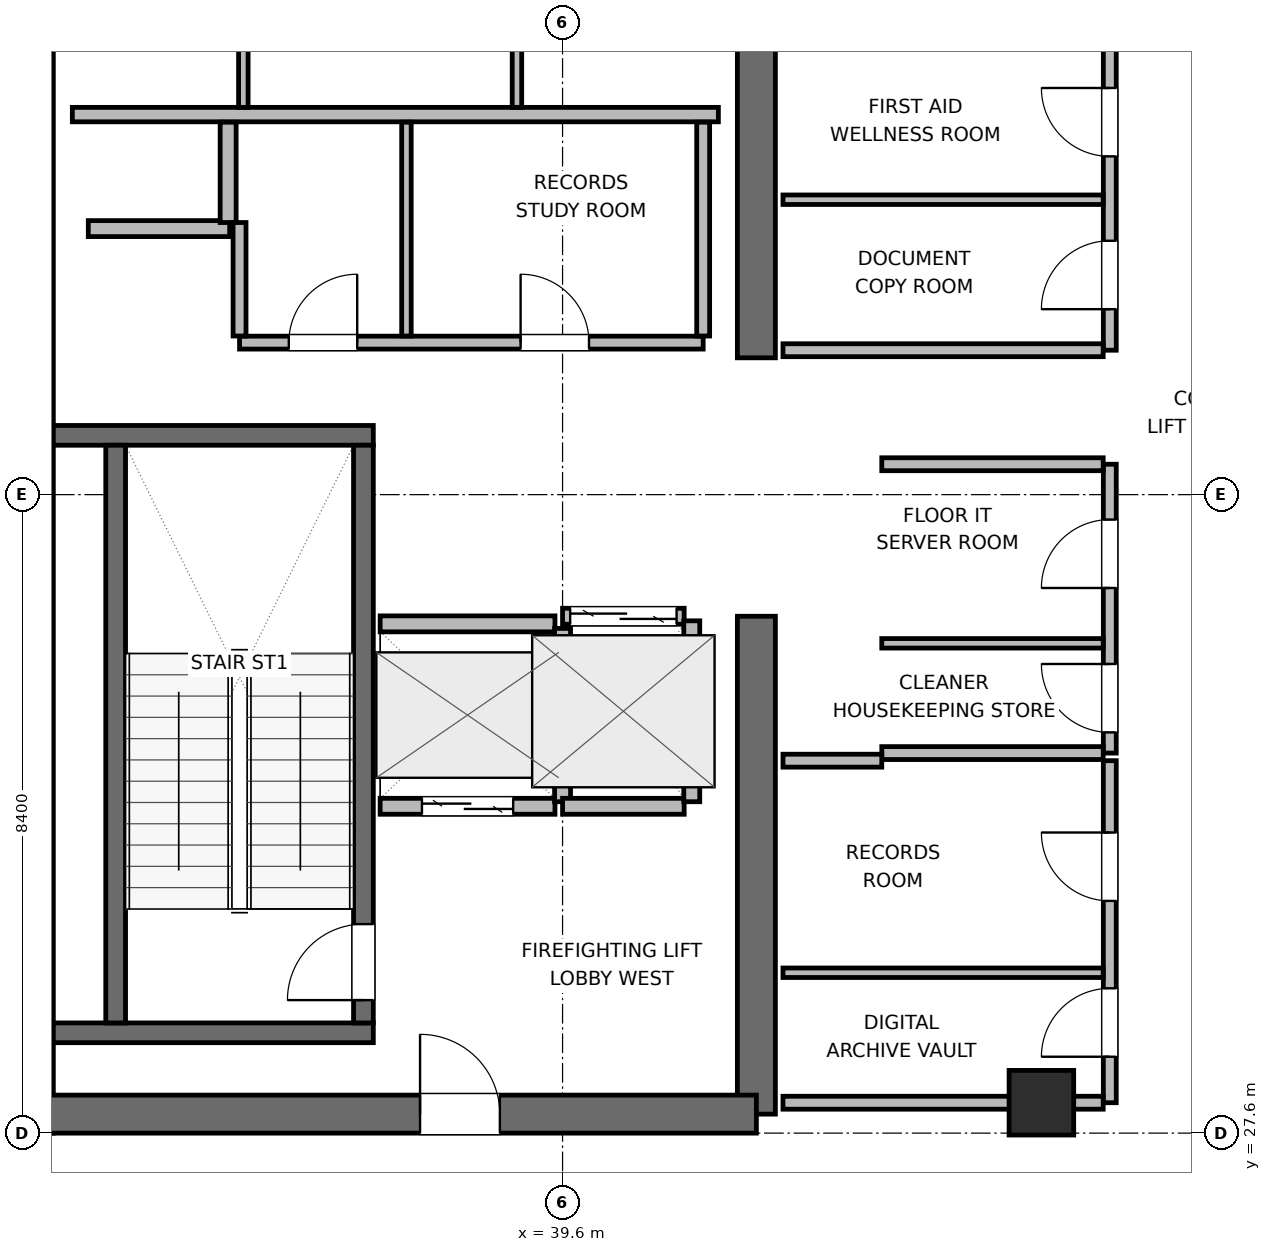
"""IFC4 building model, lengths in metres.
Left out: names, types, materials, properties, quantities, classifications, styles, units other than length and angle.
Written with IfcOpenShell. Run it as: python <this file> out.ifc"""

import sys

from ifc_helpers import new_model, si_unit, direction, frame, frame_2d, origin, origin_2d, place, context, subcontext, project, spatial, rectangle, extrude, element, fill, save


model = new_model("IFC4")
c1 = context("Model", 3, precision=1e-05, world=origin(), true_north=direction((0.0, 1.0)))
c2 = subcontext(c1, "Body", "Model", "MODEL_VIEW")
j1 = project(units=[si_unit("LENGTHUNIT", "METRE"), si_unit("PLANEANGLEUNIT", "RADIAN")], contexts=[c1])
p1 = place(None, origin())
s1 = spatial("IfcSite", under=j1, at=p1, CompositionType="ELEMENT")
p2 = place(p1, origin())
s2 = spatial("IfcBuilding", under=s1, at=p2, CompositionType="ELEMENT")
p3 = place(p2, frame((0.0, 0.0, 350.4)))
s3 = spatial("IfcBuildingStorey", under=s2, at=p3, CompositionType="ELEMENT", Elevation=350.4)
p4 = place(p3, frame((32.65, 27.6, 0.0), z_axis=(0.0, 0.0, 1.0), x_axis=(0.0, 1.0, 0.0)))
e1 = element("IfcWall", 1, at=p4, inside=s3, PredefinedType="SHEAR", context=c2, shape_type="SweptSolid", body=[
    extrude(rectangle(XDim=16.8, YDim=0.5, at=frame_2d((8.4, 0.0))), origin(), (0.0, 0.0, 1.0), 4.5),
])
p5 = place(p3, frame((42.15, 27.85, 0.0), z_axis=(0.0, 0.0, 1.0), x_axis=(0.0, 1.0, 0.0)))
e2 = element("IfcWall", 2, at=p5, inside=s3, PredefinedType="SHEAR", context=c2, shape_type="SweptSolid", body=[
    extrude(rectangle(XDim=6.55, YDim=0.5, at=frame_2d((3.275, 0.0))), origin(), (0.0, 0.0, 1.0), 4.5),
])
p6 = place(p3, frame((42.15, 37.8, 0.0), z_axis=(0.0, 0.0, 1.0), x_axis=(0.0, 1.0, 0.0)))
e3 = element("IfcWall", 3, at=p6, inside=s3, PredefinedType="SHEAR", context=c2, shape_type="SweptSolid", body=[
    extrude(rectangle(XDim=6.35, YDim=0.5, at=frame_2d((3.175, 0.0))), origin(), (0.0, 0.0, 1.0), 4.5),
])
p7 = place(p3, frame((32.65, 27.85, 0.0), z_axis=(0.0, 0.0, 1.0), x_axis=(1.0, 0.0, 0.0)))
e4 = element("IfcWall", 4, at=p7, inside=s3, PredefinedType="SHEAR", context=c2, shape_type="SweptSolid", body=[
    extrude(rectangle(XDim=9.5, YDim=0.5, at=frame_2d((4.75, 0.0))), origin(), (0.0, 0.0, 1.0), 4.5),
])
p8 = place(p7, frame((5.075, 0.0, 0.0)))
e5 = element("IfcOpeningElement", 5, at=p8, cuts=e4, PredefinedType="OPENING", context=c2, shape_type="SweptSolid", body=[
    extrude(rectangle(XDim=1.05, YDim=2.04, at=frame_2d((0.525, 1.02))), frame((0.0, 0.26, 0.0), z_axis=(0.0, -1.0, 0.0), x_axis=(1.0, 0.0, 0.0)), (0.0, 0.0, 1.0), 0.52),
])
for number, where, z_axis, x_axis in (
    (6, (32.9, 28.92, 0.0), (0.0, 0.0, 1.0), (1.0, 0.0, 0.0)),
    (7, (32.9, 36.78, 0.0), (0.0, 0.0, 1.0), (1.0, 0.0, 0.0)),
):
    element("IfcWall", number, at=place(p3, frame(where, z_axis=z_axis, x_axis=x_axis)), inside=s3, PredefinedType="SHEAR", context=c2, shape_type="SweptSolid", body=[
        extrude(rectangle(XDim=4.21, YDim=0.26, at=frame_2d((2.105, 0.0))), origin(), (0.0, 0.0, 1.0), 4.5),
    ])
p9 = place(p3, frame((33.72, 29.05, 0.0), z_axis=(0.0, 0.0, 1.0), x_axis=(0.0, 1.0, 0.0)))
e8 = element("IfcWall", 8, at=p9, inside=s3, PredefinedType="SHEAR", context=c2, shape_type="SweptSolid", body=[
    extrude(rectangle(XDim=7.6, YDim=0.26, at=frame_2d((3.8, 0.0))), origin(), (0.0, 0.0, 1.0), 4.5),
])
p10 = place(p3, frame((36.98, 29.05, 0.0), z_axis=(0.0, 0.0, 1.0), x_axis=(0.0, 1.0, 0.0)))
e9 = element("IfcWall", 9, at=p10, inside=s3, PredefinedType="SHEAR", context=c2, shape_type="SweptSolid", body=[
    extrude(rectangle(XDim=7.6, YDim=0.26, at=frame_2d((3.8, 0.0))), origin(), (0.0, 0.0, 1.0), 4.5),
])
p11 = place(p10, frame((0.3, 0.0, 0.0)))
e10 = element("IfcOpeningElement", 10, at=p11, cuts=e9, PredefinedType="OPENING", context=c2, shape_type="SweptSolid", body=[
    extrude(rectangle(XDim=1.0, YDim=2.04, at=frame_2d((0.5, 1.02))), frame((0.0, 0.14, 0.0), z_axis=(0.0, -1.0, 0.0), x_axis=(1.0, 0.0, 0.0)), (0.0, 0.0, 1.0), 0.28),
])
p12 = place(p3, frame((45.9, 28.0, 0.0), z_axis=(0.0, 0.0, 1.0), x_axis=(1.0, 0.0, 0.0)))
e11 = element("IfcColumn", 11, at=p12, inside=s3, PredefinedType="COLUMN", context=c2, shape_type="SweptSolid", body=[
    extrude(rectangle(XDim=0.85, YDim=0.85, at=origin_2d()), origin(), (0.0, 0.0, 1.0), 4.5),
])
p13 = place(p3, frame((33.15, 41.0, 0.0), z_axis=(0.0, 0.0, 1.0), x_axis=(1.0, 0.0, 0.0)))
e12 = element("IfcWall", 12, at=p13, inside=s3, PredefinedType="PLUMBINGWALL", context=c2, shape_type="SweptSolid", body=[
    extrude(rectangle(XDim=8.5, YDim=0.19, at=frame_2d((4.25, 0.0))), origin(), (0.0, 0.0, 1.0), 4.2),
])
for number, where, z_axis, x_axis in (
    (13, (35.4, 41.095, 0.0), (0.0, 0.0, 1.0), (0.0, 1.0, 0.0)),
    (14, (39.0, 41.095, 0.0), (0.0, 0.0, 1.0), (0.0, 1.0, 0.0)),
):
    element("IfcWall", number, at=place(p3, frame(where, z_axis=z_axis, x_axis=x_axis)), inside=s3, PredefinedType="PARTITIONING", context=c2, shape_type="SweptSolid", body=[
        extrude(rectangle(XDim=2.555, YDim=0.125, at=frame_2d((1.277, 0.0))), origin(), (0.0, 0.0, 1.0), 4.2),
    ])
p14 = place(p3, frame((33.36, 39.5, 0.0), z_axis=(0.0, 0.0, 1.0), x_axis=(1.0, 0.0, 0.0)))
e15 = element("IfcWall", 15, at=p14, inside=s3, PredefinedType="PARTITIONING", context=c2, shape_type="SweptSolid", body=[
    extrude(rectangle(XDim=1.86, YDim=0.21, at=frame_2d((0.93, 0.0))), origin(), (0.0, 0.0, 1.0), 4.2),
])
p15 = place(p3, frame((35.2, 39.58, 0.0), z_axis=(0.0, 0.0, 1.0), x_axis=(0.0, 1.0, 0.0)))
e16 = element("IfcWall", 16, at=p15, inside=s3, PredefinedType="PARTITIONING", context=c2, shape_type="SweptSolid", body=[
    extrude(rectangle(XDim=1.32, YDim=0.21, at=frame_2d((0.66, 0.0))), origin(), (0.0, 0.0, 1.0), 4.2),
])
p16 = place(p3, frame((37.2, 31.9, 0.0), z_axis=(0.0, 0.0, 1.0), x_axis=(1.0, 0.0, 0.0)))
e17 = element("IfcWall", 17, at=p16, inside=s3, PredefinedType="PARTITIONING", context=c2, shape_type="SweptSolid", body=[
    extrude(rectangle(XDim=2.3, YDim=0.21, at=frame_2d((1.15, 0.0))), origin(), (0.0, 0.0, 1.0), 4.2),
])
p17 = place(p16, frame((0.55, 0.0, 0.0)))
e18 = element("IfcOpeningElement", 18, at=p17, cuts=e17, PredefinedType="OPENING", context=c2, shape_type="SweptSolid", body=[
    extrude(rectangle(XDim=1.2, YDim=2.04, at=frame_2d((0.6, 1.02))), frame((0.0, 0.115, 0.0), z_axis=(0.0, -1.0, 0.0), x_axis=(1.0, 0.0, 0.0)), (0.0, 0.0, 1.0), 0.23),
])
p18 = place(p3, frame((37.2, 34.3, 0.0), z_axis=(0.0, 0.0, 1.0), x_axis=(1.0, 0.0, 0.0)))
e19 = element("IfcWall", 19, at=p18, inside=s3, PredefinedType="PARTITIONING", context=c2, shape_type="SweptSolid", body=[
    extrude(rectangle(XDim=2.3, YDim=0.21, at=frame_2d((1.15, 0.0))), origin(), (0.0, 0.0, 1.0), 4.2),
])
p19 = place(p3, frame((39.6, 31.96, 0.0), z_axis=(0.0, 0.0, 1.0), x_axis=(0.0, 1.0, 0.0)))
e20 = element("IfcWall", 20, at=p19, inside=s3, PredefinedType="PARTITIONING", context=c2, shape_type="SweptSolid", body=[
    extrude(rectangle(XDim=2.28, YDim=0.21, at=frame_2d((1.14, 0.0))), origin(), (0.0, 0.0, 1.0), 4.2),
])
p20 = place(p3, frame((39.6, 34.4, 0.0), z_axis=(0.0, 0.0, 1.0), x_axis=(1.0, 0.0, 0.0)))
e21 = element("IfcWall", 21, at=p20, inside=s3, PredefinedType="PARTITIONING", context=c2, shape_type="SweptSolid", body=[
    extrude(rectangle(XDim=1.6, YDim=0.21, at=frame_2d((0.8, 0.0))), origin(), (0.0, 0.0, 1.0), 4.2),
])
p21 = place(p20, frame((0.1, 0.0, 0.0)))
e22 = element("IfcOpeningElement", 22, at=p21, cuts=e21, PredefinedType="OPENING", context=c2, shape_type="SweptSolid", body=[
    extrude(rectangle(XDim=1.4, YDim=2.06, at=frame_2d((0.7, 1.03))), frame((0.0, 0.115, 0.0), z_axis=(0.0, -1.0, 0.0), x_axis=(1.0, 0.0, 0.0)), (0.0, 0.0, 1.0), 0.23),
])
p22 = place(p3, frame((39.6, 31.9, 0.0), z_axis=(0.0, 0.0, 1.0), x_axis=(1.0, 0.0, 0.0)))
e23 = element("IfcWall", 23, at=p22, inside=s3, PredefinedType="PARTITIONING", context=c2, shape_type="SweptSolid", body=[
    extrude(rectangle(XDim=1.6, YDim=0.21, at=frame_2d((0.8, 0.0))), origin(), (0.0, 0.0, 1.0), 4.2),
])
p23 = place(p3, frame((41.3, 31.96, 0.0), z_axis=(0.0, 0.0, 1.0), x_axis=(0.0, 1.0, 0.0)))
e24 = element("IfcWall", 24, at=p23, inside=s3, PredefinedType="PARTITIONING", context=c2, shape_type="SweptSolid", body=[
    extrude(rectangle(XDim=2.38, YDim=0.21, at=frame_2d((1.19, 0.0))), origin(), (0.0, 0.0, 1.0), 4.2),
])
p24 = place(p3, frame((35.35, 38.0, 0.0), z_axis=(0.0, 0.0, 1.0), x_axis=(1.0, 0.0, 0.0)))
e25 = element("IfcWall", 25, at=p24, inside=s3, PredefinedType="PARTITIONING", context=c2, shape_type="SweptSolid", body=[
    extrude(rectangle(XDim=6.1, YDim=0.17, at=frame_2d((3.05, 0.0))), origin(), (0.0, 0.0, 1.0), 4.2),
])
p25 = place(p24, frame((0.648, 0.0, 0.0)))
e26 = element("IfcOpeningElement", 26, at=p25, cuts=e25, PredefinedType="OPENING", context=c2, shape_type="SweptSolid", body=[
    extrude(rectangle(XDim=0.9, YDim=2.02, at=frame_2d((0.45, 1.01))), frame((0.0, 0.095, 0.0), z_axis=(0.0, -1.0, 0.0), x_axis=(1.0, 0.0, 0.0)), (0.0, 0.0, 1.0), 0.19),
])
p26 = place(p24, frame((3.698, 0.0, 0.0)))
e27 = element("IfcOpeningElement", 27, at=p26, cuts=e25, PredefinedType="OPENING", context=c2, shape_type="SweptSolid", body=[
    extrude(rectangle(XDim=0.9, YDim=2.02, at=frame_2d((0.45, 1.01))), frame((0.0, 0.095, 0.0), z_axis=(0.0, -1.0, 0.0), x_axis=(1.0, 0.0, 0.0)), (0.0, 0.0, 1.0), 0.19),
])
p27 = place(p3, frame((35.35, 38.087, 0.0), z_axis=(0.0, 0.0, 1.0), x_axis=(0.0, 1.0, 0.0)))
e28 = element("IfcWall", 28, at=p27, inside=s3, PredefinedType="PARTITIONING", context=c2, shape_type="SweptSolid", body=[
    extrude(rectangle(XDim=1.493, YDim=0.17, at=frame_2d((0.747, 0.0))), origin(), (0.0, 0.0, 1.0), 4.2),
])
p28 = place(p3, frame((41.45, 38.087, 0.0), z_axis=(0.0, 0.0, 1.0), x_axis=(0.0, 1.0, 0.0)))
e29 = element("IfcWall", 29, at=p28, inside=s3, PredefinedType="PARTITIONING", context=c2, shape_type="SweptSolid", body=[
    extrude(rectangle(XDim=2.813, YDim=0.17, at=frame_2d((1.406, 0.0))), origin(), (0.0, 0.0, 1.0), 4.2),
])
p29 = place(p3, frame((37.546, 38.087, 0.0), z_axis=(0.0, 0.0, 1.0), x_axis=(0.0, 1.0, 0.0)))
e30 = element("IfcWall", 30, at=p29, inside=s3, PredefinedType="PARTITIONING", context=c2, shape_type="SweptSolid", body=[
    extrude(rectangle(XDim=2.813, YDim=0.125, at=frame_2d((1.406, 0.0))), origin(), (0.0, 0.0, 1.0), 4.2),
])
p30 = place(p3, frame((46.8, 32.6, 0.0), z_axis=(0.0, 0.0, 1.0), x_axis=(0.0, 1.0, 0.0)))
e31 = element("IfcWall", 31, at=p30, inside=s3, PredefinedType="PARTITIONING", context=c2, shape_type="SweptSolid", body=[
    extrude(rectangle(XDim=3.8, YDim=0.17, at=frame_2d((1.9, 0.0))), origin(), (0.0, 0.0, 1.0), 4.2),
])
p31 = place(p30, frame((0.272, 0.0, 0.0)))
e32 = element("IfcOpeningElement", 32, at=p31, cuts=e31, PredefinedType="OPENING", context=c2, shape_type="SweptSolid", body=[
    extrude(rectangle(XDim=0.9, YDim=2.02, at=frame_2d((0.45, 1.01))), frame((0.0, 0.095, 0.0), z_axis=(0.0, -1.0, 0.0), x_axis=(1.0, 0.0, 0.0)), (0.0, 0.0, 1.0), 0.19),
])
p32 = place(p30, frame((2.172, 0.0, 0.0)))
e33 = element("IfcOpeningElement", 33, at=p32, cuts=e31, PredefinedType="OPENING", context=c2, shape_type="SweptSolid", body=[
    extrude(rectangle(XDim=0.9, YDim=2.02, at=frame_2d((0.45, 1.01))), frame((0.0, 0.095, 0.0), z_axis=(0.0, -1.0, 0.0), x_axis=(1.0, 0.0, 0.0)), (0.0, 0.0, 1.0), 0.19),
])
for number, where, z_axis, x_axis in (
    (34, (43.8, 32.6, 0.0), (0.0, 0.0, 1.0), (1.0, 0.0, 0.0)),
    (35, (43.8, 36.4, 0.0), (0.0, 0.0, 1.0), (1.0, 0.0, 0.0)),
):
    element("IfcWall", number, at=place(p3, frame(where, z_axis=z_axis, x_axis=x_axis)), inside=s3, PredefinedType="PARTITIONING", context=c2, shape_type="SweptSolid", body=[
        extrude(rectangle(XDim=2.913, YDim=0.17, at=frame_2d((1.457, 0.0))), origin(), (0.0, 0.0, 1.0), 4.2),
    ])
p33 = place(p3, frame((43.8, 34.044, 0.0), z_axis=(0.0, 0.0, 1.0), x_axis=(1.0, 0.0, 0.0)))
e36 = element("IfcWall", 36, at=p33, inside=s3, PredefinedType="PARTITIONING", context=c2, shape_type="SweptSolid", body=[
    extrude(rectangle(XDim=2.913, YDim=0.125, at=frame_2d((1.457, 0.0))), origin(), (0.0, 0.0, 1.0), 4.2),
])
p34 = place(p3, frame((46.8, 28.0, 0.0), z_axis=(0.0, 0.0, 1.0), x_axis=(0.0, 1.0, 0.0)))
e37 = element("IfcWall", 37, at=p34, inside=s3, PredefinedType="PARTITIONING", context=c2, shape_type="SweptSolid", body=[
    extrude(rectangle(XDim=4.5, YDim=0.17, at=frame_2d((2.25, 0.0))), origin(), (0.0, 0.0, 1.0), 4.2),
])
p35 = place(p34, frame((0.605, 0.0, 0.0)))
e38 = element("IfcOpeningElement", 38, at=p35, cuts=e37, PredefinedType="OPENING", context=c2, shape_type="SweptSolid", body=[
    extrude(rectangle(XDim=0.9, YDim=2.02, at=frame_2d((0.45, 1.01))), frame((0.0, 0.095, 0.0), z_axis=(0.0, -1.0, 0.0), x_axis=(1.0, 0.0, 0.0)), (0.0, 0.0, 1.0), 0.19),
])
p36 = place(p34, frame((2.655, 0.0, 0.0)))
e39 = element("IfcOpeningElement", 39, at=p36, cuts=e37, PredefinedType="OPENING", context=c2, shape_type="SweptSolid", body=[
    extrude(rectangle(XDim=0.9, YDim=2.02, at=frame_2d((0.45, 1.01))), frame((0.0, 0.095, 0.0), z_axis=(0.0, -1.0, 0.0), x_axis=(1.0, 0.0, 0.0)), (0.0, 0.0, 1.0), 0.19),
])
p37 = place(p3, frame((42.5, 28.0, 0.0), z_axis=(0.0, 0.0, 1.0), x_axis=(1.0, 0.0, 0.0)))
e40 = element("IfcWall", 40, at=p37, inside=s3, PredefinedType="PARTITIONING", context=c2, shape_type="SweptSolid", body=[
    extrude(rectangle(XDim=4.213, YDim=0.17, at=frame_2d((2.106, 0.0))), origin(), (0.0, 0.0, 1.0), 3.285),
])
p38 = place(p3, frame((42.5, 32.5, 0.0), z_axis=(0.0, 0.0, 1.0), x_axis=(1.0, 0.0, 0.0)))
e41 = element("IfcWall", 41, at=p38, inside=s3, PredefinedType="PARTITIONING", context=c2, shape_type="SweptSolid", body=[
    extrude(rectangle(XDim=1.3, YDim=0.17, at=frame_2d((0.65, 0.0))), origin(), (0.0, 0.0, 1.0), 4.2),
])
p39 = place(p3, frame((42.5, 29.71, 0.0), z_axis=(0.0, 0.0, 1.0), x_axis=(1.0, 0.0, 0.0)))
e42 = element("IfcWall", 42, at=p39, inside=s3, PredefinedType="PARTITIONING", context=c2, shape_type="SweptSolid", body=[
    extrude(rectangle(XDim=4.213, YDim=0.125, at=frame_2d((2.106, 0.0))), origin(), (0.0, 0.0, 1.0), 4.2),
])
p40 = place(p3, frame((46.8, 37.9, 0.0), z_axis=(0.0, 0.0, 1.0), x_axis=(0.0, 1.0, 0.0)))
e43 = element("IfcWall", 43, at=p40, inside=s3, PredefinedType="PARTITIONING", context=c2, shape_type="SweptSolid", body=[
    extrude(rectangle(XDim=6.0, YDim=0.17, at=frame_2d((3.0, 0.0))), origin(), (0.0, 0.0, 1.0), 4.2),
])
p41 = place(p40, frame((0.54, 0.0, 0.0)))
e44 = element("IfcOpeningElement", 44, at=p41, cuts=e43, PredefinedType="OPENING", context=c2, shape_type="SweptSolid", body=[
    extrude(rectangle(XDim=0.9, YDim=2.02, at=frame_2d((0.45, 1.01))), frame((0.0, 0.095, 0.0), z_axis=(0.0, -1.0, 0.0), x_axis=(1.0, 0.0, 0.0)), (0.0, 0.0, 1.0), 0.19),
])
p42 = place(p40, frame((2.55, 0.0, 0.0)))
e45 = element("IfcOpeningElement", 45, at=p42, cuts=e43, PredefinedType="OPENING", context=c2, shape_type="SweptSolid", body=[
    extrude(rectangle(XDim=0.9, YDim=2.02, at=frame_2d((0.45, 1.01))), frame((0.0, 0.095, 0.0), z_axis=(0.0, -1.0, 0.0), x_axis=(1.0, 0.0, 0.0)), (0.0, 0.0, 1.0), 0.19),
])
p43 = place(p40, frame((4.56, 0.0, 0.0)))
e46 = element("IfcOpeningElement", 46, at=p43, cuts=e43, PredefinedType="OPENING", context=c2, shape_type="SweptSolid", body=[
    extrude(rectangle(XDim=0.9, YDim=2.02, at=frame_2d((0.45, 1.01))), frame((0.0, 0.095, 0.0), z_axis=(0.0, -1.0, 0.0), x_axis=(1.0, 0.0, 0.0)), (0.0, 0.0, 1.0), 0.19),
])
p44 = place(p3, frame((42.5, 37.9, 0.0), z_axis=(0.0, 0.0, 1.0), x_axis=(1.0, 0.0, 0.0)))
e47 = element("IfcWall", 47, at=p44, inside=s3, PredefinedType="PARTITIONING", context=c2, shape_type="SweptSolid", body=[
    extrude(rectangle(XDim=4.213, YDim=0.17, at=frame_2d((2.106, 0.0))), origin(), (0.0, 0.0, 1.0), 4.2),
])
p45 = place(p3, frame((42.5, 39.88, 0.0), z_axis=(0.0, 0.0, 1.0), x_axis=(1.0, 0.0, 0.0)))
e48 = element("IfcWall", 48, at=p45, inside=s3, PredefinedType="PARTITIONING", context=c2, shape_type="SweptSolid", body=[
    extrude(rectangle(XDim=4.213, YDim=0.125, at=frame_2d((2.106, 0.0))), origin(), (0.0, 0.0, 1.0), 4.2),
])
p46 = place(p11, origin())
e49 = element("IfcDoor", 49, at=p46, inside=s3, OperationType="SINGLE_SWING_LEFT", PredefinedType="DOOR", context=c2, shape_type="SweptSolid", body=[
    extrude(rectangle(XDim=1.0, YDim=2.04, at=frame_2d((0.5, 1.02))), frame((0.0, 0.025, 0.0), z_axis=(0.0, -1.0, 0.0), x_axis=(1.0, 0.0, 0.0)), (0.0, 0.0, 1.0), 0.05),
])
fill(e10, e49)
p47 = place(p17, origin())
e50 = element("IfcDoor", 50, at=p47, inside=s3, OperationType="DOUBLE_DOOR_SLIDING", PredefinedType="DOOR", context=c2, shape_type="SweptSolid", body=[
    extrude(rectangle(XDim=1.2, YDim=2.04, at=frame_2d((0.6, 1.02))), frame((0.0, 0.025, 0.0), z_axis=(0.0, -1.0, 0.0), x_axis=(1.0, 0.0, 0.0)), (0.0, 0.0, 1.0), 0.05),
])
fill(e18, e50)
p48 = place(p21, origin())
e51 = element("IfcDoor", 51, at=p48, inside=s3, OperationType="DOUBLE_DOOR_SLIDING", PredefinedType="DOOR", context=c2, shape_type="SweptSolid", body=[
    extrude(rectangle(XDim=1.4, YDim=2.06, at=frame_2d((0.7, 1.03))), frame((0.0, 0.025, 0.0), z_axis=(0.0, -1.0, 0.0), x_axis=(1.0, 0.0, 0.0)), (0.0, 0.0, 1.0), 0.05),
])
fill(e22, e51)
p49 = place(p8, origin())
e52 = element("IfcDoor", 52, at=p49, inside=s3, OperationType="SINGLE_SWING_LEFT", PredefinedType="DOOR", context=c2, shape_type="SweptSolid", body=[
    extrude(rectangle(XDim=1.05, YDim=2.04, at=frame_2d((0.525, 1.02))), frame((0.0, 0.025, 0.0), z_axis=(0.0, -1.0, 0.0), x_axis=(1.0, 0.0, 0.0)), (0.0, 0.0, 1.0), 0.05),
])
fill(e5, e52)
p50 = place(p25, origin())
e53 = element("IfcDoor", 53, at=p50, inside=s3, OperationType="SINGLE_SWING_RIGHT", PredefinedType="DOOR", context=c2, shape_type="SweptSolid", body=[
    extrude(rectangle(XDim=0.9, YDim=2.02, at=frame_2d((0.45, 1.01))), frame((0.0, 0.025, 0.0), z_axis=(0.0, -1.0, 0.0), x_axis=(1.0, 0.0, 0.0)), (0.0, 0.0, 1.0), 0.05),
])
fill(e26, e53)
p51 = place(p26, origin())
e54 = element("IfcDoor", 54, at=p51, inside=s3, OperationType="SINGLE_SWING_LEFT", PredefinedType="DOOR", context=c2, shape_type="SweptSolid", body=[
    extrude(rectangle(XDim=0.9, YDim=2.02, at=frame_2d((0.45, 1.01))), frame((0.0, 0.025, 0.0), z_axis=(0.0, -1.0, 0.0), x_axis=(1.0, 0.0, 0.0)), (0.0, 0.0, 1.0), 0.05),
])
fill(e27, e54)
p52 = place(p31, origin())
e55 = element("IfcDoor", 55, at=p52, inside=s3, OperationType="SINGLE_SWING_RIGHT", PredefinedType="DOOR", context=c2, shape_type="SweptSolid", body=[
    extrude(rectangle(XDim=0.9, YDim=2.02, at=frame_2d((0.45, 1.01))), frame((0.0, 0.025, 0.0), z_axis=(0.0, -1.0, 0.0), x_axis=(1.0, 0.0, 0.0)), (0.0, 0.0, 1.0), 0.05),
])
fill(e32, e55)
p53 = place(p32, origin())
e56 = element("IfcDoor", 56, at=p53, inside=s3, OperationType="SINGLE_SWING_LEFT", PredefinedType="DOOR", context=c2, shape_type="SweptSolid", body=[
    extrude(rectangle(XDim=0.9, YDim=2.02, at=frame_2d((0.45, 1.01))), frame((0.0, 0.025, 0.0), z_axis=(0.0, -1.0, 0.0), x_axis=(1.0, 0.0, 0.0)), (0.0, 0.0, 1.0), 0.05),
])
fill(e33, e56)
p54 = place(p35, origin())
e57 = element("IfcDoor", 57, at=p54, inside=s3, OperationType="SINGLE_SWING_LEFT", PredefinedType="DOOR", context=c2, shape_type="SweptSolid", body=[
    extrude(rectangle(XDim=0.9, YDim=2.02, at=frame_2d((0.45, 1.01))), frame((0.0, 0.025, 0.0), z_axis=(0.0, -1.0, 0.0), x_axis=(1.0, 0.0, 0.0)), (0.0, 0.0, 1.0), 0.05),
])
fill(e38, e57)
p55 = place(p36, origin())
e58 = element("IfcDoor", 58, at=p55, inside=s3, OperationType="SINGLE_SWING_RIGHT", PredefinedType="DOOR", context=c2, shape_type="SweptSolid", body=[
    extrude(rectangle(XDim=0.9, YDim=2.02, at=frame_2d((0.45, 1.01))), frame((0.0, 0.025, 0.0), z_axis=(0.0, -1.0, 0.0), x_axis=(1.0, 0.0, 0.0)), (0.0, 0.0, 1.0), 0.05),
])
fill(e39, e58)
p56 = place(p41, origin())
e59 = element("IfcDoor", 59, at=p56, inside=s3, OperationType="SINGLE_SWING_LEFT", PredefinedType="DOOR", context=c2, shape_type="SweptSolid", body=[
    extrude(rectangle(XDim=0.9, YDim=2.02, at=frame_2d((0.45, 1.01))), frame((0.0, 0.025, 0.0), z_axis=(0.0, -1.0, 0.0), x_axis=(1.0, 0.0, 0.0)), (0.0, 0.0, 1.0), 0.05),
])
fill(e44, e59)
p57 = place(p42, origin())
e60 = element("IfcDoor", 60, at=p57, inside=s3, OperationType="SINGLE_SWING_RIGHT", PredefinedType="DOOR", context=c2, shape_type="SweptSolid", body=[
    extrude(rectangle(XDim=0.9, YDim=2.02, at=frame_2d((0.45, 1.01))), frame((0.0, 0.025, 0.0), z_axis=(0.0, -1.0, 0.0), x_axis=(1.0, 0.0, 0.0)), (0.0, 0.0, 1.0), 0.05),
])
fill(e45, e60)
save(model, sys.argv[1])
